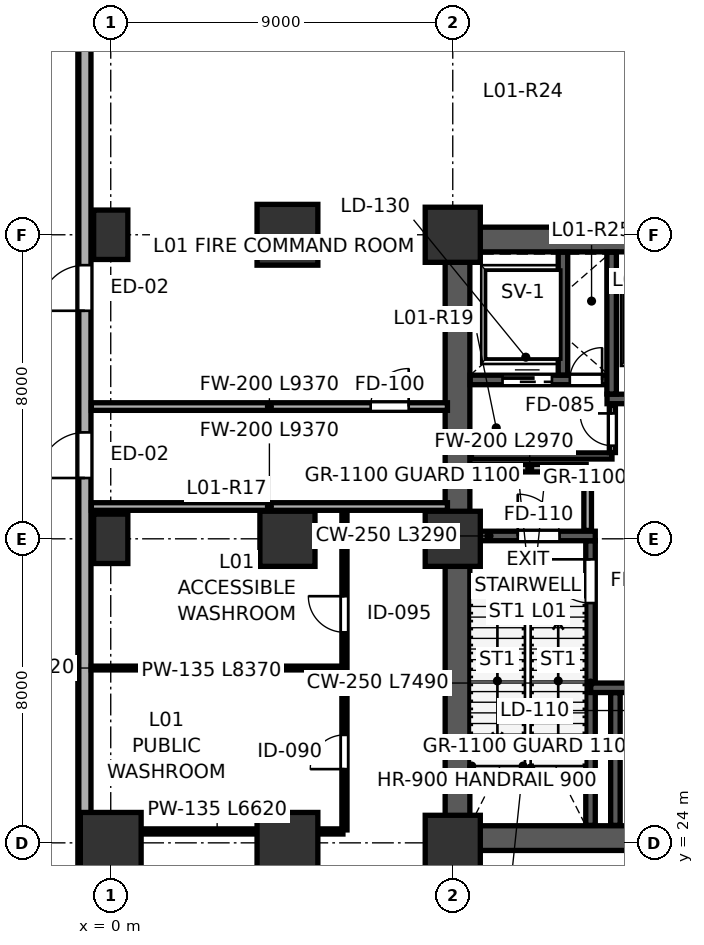
"""IFC4 building model, lengths in metres.
Left out: names, types, materials, properties, quantities, classifications, styles, units other than length and angle.
Written with IfcOpenShell. Run it as: python <this file> out.ifc"""

import sys

from ifc_helpers import new_model, si_unit, direction, frame, frame_2d, origin, origin_2d, place, context, subcontext, project, spatial, rectangle, extrude, source, transform, mapped, element, fill, save


model = new_model("IFC4")
c1 = context("Model", 3, precision=1e-05, world=origin(), true_north=direction((0.0, 1.0)))
c2 = subcontext(c1, "Body", "Model", "MODEL_VIEW")
j1 = project(units=[si_unit("LENGTHUNIT", "METRE"), si_unit("PLANEANGLEUNIT", "RADIAN")], contexts=[c1])
p1 = place(None, origin())
s1 = spatial("IfcSite", under=j1, at=p1, CompositionType="ELEMENT")
p2 = place(p1, origin())
s2 = spatial("IfcBuilding", under=s1, at=p2, CompositionType="ELEMENT")
p3 = place(p2, origin())
s3 = spatial("IfcBuildingStorey", under=s2, at=p3, CompositionType="ELEMENT", Elevation=0.0)
m1 = source(origin(), c2, "Body", "SweptSolid", [
    extrude(rectangle(XDim=1.6, YDim=1.6, at=origin_2d()), origin(), (0.0, 0.0, 1.0), 5.999),
])
p4 = place(p3, frame((0.0, 24.0, 0.001), z_axis=(0.0, 0.0, 1.0), x_axis=(1.0, 0.0, 0.0)))
e1 = element("IfcColumn", 1, at=p4, inside=s3, PredefinedType="COLUMN", context=c2, shape_type="MappedRepresentation", body=[
    mapped(m1, transform((0.0, 0.0, 0.0), scale=1.0)),
])
m2 = source(origin(), c2, "Body", "SweptSolid", [
    extrude(rectangle(XDim=0.9, YDim=1.3, at=origin_2d()), origin(), (0.0, 0.0, 1.0), 5.999),
])
for number, where, z_axis, x_axis in (
    (2, (0.0, 32.0, 0.001), (0.0, 0.0, 1.0), (1.0, 0.0, 0.0)),
    (3, (0.0, 40.0, 0.001), (0.0, 0.0, 1.0), (1.0, 0.0, 0.0)),
):
    element("IfcColumn", number, at=place(p3, frame(where, z_axis=z_axis, x_axis=x_axis)), inside=s3, PredefinedType="PILASTER", context=c2, shape_type="MappedRepresentation", body=[
        mapped(m2, transform((0.0, 0.0, 0.0), scale=1.0)),
    ])
m3 = source(origin(), c2, "Body", "SweptSolid", [
    extrude(rectangle(XDim=1.45, YDim=1.45, at=origin_2d()), origin(), (0.0, 0.0, 1.0), 5.999),
])
p5 = place(p3, frame((9.0, 24.0, 0.001), z_axis=(0.0, 0.0, 1.0), x_axis=(1.0, 0.0, 0.0)))
e4 = element("IfcColumn", 4, at=p5, inside=s3, PredefinedType="COLUMN", context=c2, shape_type="MappedRepresentation", body=[
    mapped(m3, transform((0.0, 0.0, 0.0), scale=1.0)),
])
m4 = source(origin(), c2, "Body", "SweptSolid", [
    extrude(rectangle(XDim=1.45, YDim=1.45, at=origin_2d()), origin(), (0.0, 0.0, 1.0), 5.999),
])
for number, where, z_axis, x_axis in (
    (5, (9.0, 32.0, 0.001), (0.0, 0.0, 1.0), (1.0, 0.0, 0.0)),
    (6, (9.0, 40.0, 0.001), (0.0, 0.0, 1.0), (1.0, 0.0, 0.0)),
):
    element("IfcColumn", number, at=place(p3, frame(where, z_axis=z_axis, x_axis=x_axis)), inside=s3, PredefinedType="COLUMN", context=c2, shape_type="MappedRepresentation", body=[
        mapped(m4, transform((0.0, 0.0, 0.0), scale=1.0)),
    ])
p6 = place(p3, frame((4.65, 24.0, 0.001), z_axis=(0.0, 0.0, 1.0), x_axis=(1.0, 0.0, 0.0)))
e7 = element("IfcColumn", 7, at=p6, inside=s3, PredefinedType="COLUMN", context=c2, shape_type="MappedRepresentation", body=[
    mapped(m1, transform((0.0, 0.0, 0.0), scale=1.0)),
])
p7 = place(p3, frame((4.65, 32.0, 0.001), z_axis=(0.0, 0.0, 1.0), x_axis=(1.0, 0.0, 0.0)))
e8 = element("IfcColumn", 8, at=p7, inside=s3, PredefinedType="COLUMN", context=c2, shape_type="MappedRepresentation", body=[
    mapped(m4, transform((0.0, 0.0, 0.0), scale=1.0)),
])
m5 = source(origin(), c2, "Body", "SweptSolid", [
    extrude(rectangle(XDim=1.6, YDim=1.6, at=origin_2d()), origin(), (0.0, 0.0, 1.0), 5.999),
])
p8 = place(p3, frame((4.65, 40.0, 0.001), z_axis=(0.0, 0.0, 1.0), x_axis=(1.0, 0.0, 0.0)))
e9 = element("IfcColumn", 9, at=p8, inside=s3, PredefinedType="COLUMN", context=c2, shape_type="MappedRepresentation", body=[
    mapped(m5, transform((0.0, 0.0, 0.0), scale=1.0)),
])
p9 = place(p3, frame((-0.68, 3.6, 0.0), z_axis=(0.0, 0.0, 1.0), x_axis=(0.0, 1.0, 0.0)))
e10 = element("IfcWall", 10, at=p9, inside=s3, PredefinedType="SOLIDWALL", context=c2, shape_type="SweptSolid", body=[
    extrude(rectangle(XDim=49.8, YDim=0.32, at=frame_2d((24.9, 0.0))), origin(), (0.0, 0.0, 1.0), 5.74),
])
p10 = place(p9, frame((34.4, 0.0, 0.0)))
e11 = element("IfcOpeningElement", 11, at=p10, cuts=e10, PredefinedType="OPENING", context=c2, shape_type="SweptSolid", body=[
    extrude(rectangle(XDim=1.2, YDim=2.2, at=frame_2d((0.6, 1.1))), frame((0.0, 0.17, 0.0), z_axis=(0.0, -1.0, 0.0), x_axis=(1.0, 0.0, 0.0)), (0.0, 0.0, 1.0), 0.34),
])
p11 = place(p9, frame((30.0, 0.0, 0.0)))
e12 = element("IfcOpeningElement", 12, at=p11, cuts=e10, PredefinedType="OPENING", context=c2, shape_type="SweptSolid", body=[
    extrude(rectangle(XDim=1.2, YDim=2.2, at=frame_2d((0.6, 1.1))), frame((0.0, 0.17, 0.0), z_axis=(0.0, -1.0, 0.0), x_axis=(1.0, 0.0, 0.0)), (0.0, 0.0, 1.0), 0.34),
])
p12 = place(p9, frame((5.4, 0.0, 0.0)))
e13 = element("IfcOpeningElement", 13, at=p12, cuts=e10, PredefinedType="OPENING", context=c2, shape_type="SweptSolid", body=[
    extrude(rectangle(XDim=1.2, YDim=2.2, at=frame_2d((0.6, 1.1))), frame((0.0, 0.17, 0.0), z_axis=(0.0, -1.0, 0.0), x_axis=(1.0, 0.0, 0.0)), (0.0, 0.0, 1.0), 0.34),
])
p13 = place(p3, frame((9.125, 24.45, 0.0), z_axis=(0.0, 0.0, 1.0), x_axis=(0.0, 1.0, 0.0)))
e14 = element("IfcWall", 14, at=p13, inside=s3, PredefinedType="SHEAR", context=c2, shape_type="SweptSolid", body=[
    extrude(rectangle(XDim=15.1, YDim=0.65, at=frame_2d((7.55, 0.0))), origin(), (0.0, 0.0, 1.0), 5.74),
])
for number, where, z_axis, x_axis in (
    (15, (8.8, 24.125, 0.0), (0.0, 0.0, 1.0), (1.0, 0.0, 0.0)),
    (16, (8.8, 39.875, 0.0), (0.0, 0.0, 1.0), (1.0, 0.0, 0.0)),
):
    element("IfcWall", number, at=place(p3, frame(where, z_axis=z_axis, x_axis=x_axis)), inside=s3, PredefinedType="SHEAR", context=c2, shape_type="SweptSolid", body=[
        extrude(rectangle(XDim=18.4, YDim=0.65, at=frame_2d((9.2, 0.0))), origin(), (0.0, 0.0, 1.0), 5.74),
    ])
p14 = place(p3, frame((12.625, 24.46, 0.0), z_axis=(0.0, 0.0, 1.0), x_axis=(0.0, 1.0, 0.0)))
e17 = element("IfcWall", 17, at=p14, inside=s3, PredefinedType="SHEAR", context=c2, shape_type="SweptSolid", body=[
    extrude(rectangle(XDim=7.49, YDim=0.25, at=frame_2d((3.745, 0.0))), origin(), (0.0, 0.0, 1.0), 5.74),
])
p15 = place(p14, frame((5.85, 0.0, 0.0)))
e18 = element("IfcOpeningElement", 18, at=p15, cuts=e17, PredefinedType="OPENING", context=c2, shape_type="SweptSolid", body=[
    extrude(rectangle(XDim=1.15, YDim=2.2, at=frame_2d((0.575, 1.1))), frame((0.0, 0.135, 0.0), z_axis=(0.0, -1.0, 0.0), x_axis=(1.0, 0.0, 0.0)), (0.0, 0.0, 1.0), 0.27),
])
p16 = place(p3, frame((9.46, 32.075, 0.0), z_axis=(0.0, 0.0, 1.0), x_axis=(1.0, 0.0, 0.0)))
e19 = element("IfcWall", 19, at=p16, inside=s3, PredefinedType="SHEAR", context=c2, shape_type="SweptSolid", body=[
    extrude(rectangle(XDim=3.29, YDim=0.25, at=frame_2d((1.645, 0.0))), origin(), (0.0, 0.0, 1.0), 5.74),
])
p17 = place(p16, frame((1.25, 0.0, 0.0)))
e20 = element("IfcOpeningElement", 20, at=p17, cuts=e19, PredefinedType="OPENING", context=c2, shape_type="SweptSolid", body=[
    extrude(rectangle(XDim=1.1, YDim=2.2, at=frame_2d((0.55, 1.1))), frame((0.0, 0.135, 0.0), z_axis=(0.0, -1.0, 0.0), x_axis=(1.0, 0.0, 0.0)), (0.0, 0.0, 1.0), 0.27),
])
p18 = place(p3, frame((9.46, 36.18, 0.0), z_axis=(0.0, 0.0, 1.0), x_axis=(1.0, 0.0, 0.0)))
e21 = element("IfcWall", 21, at=p18, inside=s3, PredefinedType="SHEAR", context=c2, shape_type="SweptSolid", body=[
    extrude(rectangle(XDim=3.79, YDim=0.25, at=frame_2d((1.895, 0.0))), origin(), (0.0, 0.0, 1.0), 5.74),
])
p19 = place(p18, frame((2.62, 0.0, 0.0)))
e22 = element("IfcOpeningElement", 22, at=p19, cuts=e21, PredefinedType="OPENING", context=c2, shape_type="SweptSolid", body=[
    extrude(rectangle(XDim=0.85, YDim=2.1, at=frame_2d((0.425, 1.05))), frame((0.0, 0.135, 0.0), z_axis=(0.0, -1.0, 0.0), x_axis=(1.0, 0.0, 0.0)), (0.0, 0.0, 1.0), 0.27),
])
p20 = place(p18, frame((0.85, 0.0, 0.0)))
e23 = element("IfcOpeningElement", 23, at=p20, cuts=e21, PredefinedType="OPENING", context=c2, shape_type="SweptSolid", body=[
    extrude(rectangle(XDim=1.3, YDim=2.25, at=frame_2d((0.65, 1.125))), frame((0.0, 0.135, 0.0), z_axis=(0.0, -1.0, 0.0), x_axis=(1.0, 0.0, 0.0)), (0.0, 0.0, 1.0), 0.27),
])
p21 = place(p3, frame((11.9, 36.31, 0.0), z_axis=(0.0, 0.0, 1.0), x_axis=(0.0, 1.0, 0.0)))
e24 = element("IfcWall", 24, at=p21, inside=s3, PredefinedType="SHEAR", context=c2, shape_type="SweptSolid", body=[
    extrude(rectangle(XDim=3.23, YDim=0.25, at=frame_2d((1.615, 0.0))), origin(), (0.0, 0.0, 1.0), 5.74),
])
p22 = place(p3, frame((12.63, 28.08, 0.0), z_axis=(0.0, 0.0, 1.0), x_axis=(1.0, 0.0, 0.0)))
e25 = element("IfcWall", 25, at=p22, inside=s3, PredefinedType="SHEAR", context=c2, shape_type="SweptSolid", body=[
    extrude(rectangle(XDim=6.71, YDim=0.25, at=frame_2d((3.355, 0.0))), origin(), (0.0, 0.0, 1.0), 5.74),
])
p23 = place(p22, frame((1.43, 0.0, 0.0)))
e26 = element("IfcOpeningElement", 26, at=p23, cuts=e25, PredefinedType="OPENING", context=c2, shape_type="SweptSolid", body=[
    extrude(rectangle(XDim=1.1, YDim=2.2, at=frame_2d((0.55, 1.1))), frame((0.0, 0.135, 0.0), z_axis=(0.0, -1.0, 0.0), x_axis=(1.0, 0.0, 0.0)), (0.0, 0.0, 1.0), 0.27),
])
p24 = place(p22, frame((4.43, 0.0, 0.0)))
e27 = element("IfcOpeningElement", 27, at=p24, cuts=e25, PredefinedType="OPENING", context=c2, shape_type="SweptSolid", body=[
    extrude(rectangle(XDim=1.1, YDim=2.2, at=frame_2d((0.55, 1.1))), frame((0.0, 0.135, 0.0), z_axis=(0.0, -1.0, 0.0), x_axis=(1.0, 0.0, 0.0)), (0.0, 0.0, 1.0), 0.27),
])
p25 = place(p3, frame((13.28, 24.46, 0.0), z_axis=(0.0, 0.0, 1.0), x_axis=(0.0, 1.0, 0.0)))
e28 = element("IfcWall", 28, at=p25, inside=s3, PredefinedType="SHEAR", context=c2, shape_type="SweptSolid", body=[
    extrude(rectangle(XDim=3.49, YDim=0.25, at=frame_2d((1.745, 0.0))), origin(), (0.0, 0.0, 1.0), 5.74),
])
p26 = place(p3, frame((13.06, 35.68, 0.0), z_axis=(0.0, 0.0, 1.0), x_axis=(1.0, 0.0, 0.0)))
e29 = element("IfcWall", 29, at=p26, inside=s3, PredefinedType="SHEAR", context=c2, shape_type="SweptSolid", body=[
    extrude(rectangle(XDim=4.25, YDim=0.25, at=frame_2d((2.125, 0.0))), origin(), (0.0, 0.0, 1.0), 5.74),
])
p27 = place(p26, frame((0.65, 0.0, 0.0)))
e30 = element("IfcOpeningElement", 30, at=p27, cuts=e29, PredefinedType="OPENING", context=c2, shape_type="SweptSolid", body=[
    extrude(rectangle(XDim=1.1, YDim=2.2, at=frame_2d((0.55, 1.1))), frame((0.0, 0.135, 0.0), z_axis=(0.0, -1.0, 0.0), x_axis=(1.0, 0.0, 0.0)), (0.0, 0.0, 1.0), 0.27),
])
p28 = place(p26, frame((2.65, 0.0, 0.0)))
e31 = element("IfcOpeningElement", 31, at=p28, cuts=e29, PredefinedType="OPENING", context=c2, shape_type="SweptSolid", body=[
    extrude(rectangle(XDim=1.1, YDim=2.2, at=frame_2d((0.55, 1.1))), frame((0.0, 0.135, 0.0), z_axis=(0.0, -1.0, 0.0), x_axis=(1.0, 0.0, 0.0)), (0.0, 0.0, 1.0), 0.27),
])
p29 = place(p3, frame((13.18, 35.81, 0.0), z_axis=(0.0, 0.0, 1.0), x_axis=(0.0, 1.0, 0.0)))
e32 = element("IfcWall", 32, at=p29, inside=s3, PredefinedType="SHEAR", context=c2, shape_type="SweptSolid", body=[
    extrude(rectangle(XDim=3.73, YDim=0.25, at=frame_2d((1.865, 0.0))), origin(), (0.0, 0.0, 1.0), 5.74),
])
p30 = place(p3, frame((9.49, 34.18, 0.0), z_axis=(0.0, 0.0, 1.0), x_axis=(1.0, 0.0, 0.0)))
e33 = element("IfcWall", 33, at=p30, inside=s3, PredefinedType="PARTITIONING", context=c2, shape_type="SweptSolid", body=[
    extrude(rectangle(XDim=3.7, YDim=0.16, at=frame_2d((1.85, 0.0))), origin(), (0.0, 0.0, 1.0), 5.74),
])
p31 = place(p3, frame((13.2, 34.27, 0.0), z_axis=(0.0, 0.0, 1.0), x_axis=(0.0, 1.0, 0.0)))
e34 = element("IfcWall", 34, at=p31, inside=s3, PredefinedType="PARTITIONING", context=c2, shape_type="SweptSolid", body=[
    extrude(rectangle(XDim=1.24, YDim=0.16, at=frame_2d((0.62, 0.0))), origin(), (0.0, 0.0, 1.0), 5.74),
])
p32 = place(p31, frame((0.18, 0.0, 0.0)))
e35 = element("IfcOpeningElement", 35, at=p32, cuts=e34, PredefinedType="OPENING", context=c2, shape_type="SweptSolid", body=[
    extrude(rectangle(XDim=0.85, YDim=2.1, at=frame_2d((0.425, 1.05))), frame((0.0, 0.09, 0.0), z_axis=(0.0, -1.0, 0.0), x_axis=(1.0, 0.0, 0.0)), (0.0, 0.0, 1.0), 0.18),
])
p33 = place(p3, frame((-0.51, 24.3, 0.0), z_axis=(0.0, 0.0, 1.0), x_axis=(1.0, 0.0, 0.0)))
e36 = element("IfcWall", 36, at=p33, inside=s3, PredefinedType="PARTITIONING", context=c2, shape_type="SweptSolid", body=[
    extrude(rectangle(XDim=6.62, YDim=0.135, at=frame_2d((3.31, 0.0))), origin(), (0.0, 0.0, 1.0), 4.869),
])
p34 = place(p3, frame((-0.51, 28.6, 0.0), z_axis=(0.0, 0.0, 1.0), x_axis=(1.0, 0.0, 0.0)))
e37 = element("IfcWall", 37, at=p34, inside=s3, PredefinedType="PARTITIONING", context=c2, shape_type="SweptSolid", body=[
    extrude(rectangle(XDim=6.62, YDim=0.1, at=frame_2d((3.31, 0.0))), origin(), (0.0, 0.0, 1.0), 4.875),
])
p35 = place(p3, frame((6.15, 24.34, 0.0), z_axis=(0.0, 0.0, 1.0), x_axis=(0.0, 1.0, 0.0)))
e38 = element("IfcWall", 38, at=p35, inside=s3, PredefinedType="PARTITIONING", context=c2, shape_type="SweptSolid", body=[
    extrude(rectangle(XDim=8.37, YDim=0.135, at=frame_2d((4.185, 0.0))), origin(), (0.0, 0.0, 1.0), 4.875),
])
p36 = place(p35, frame((1.6, 0.0, 0.0)))
e39 = element("IfcOpeningElement", 39, at=p36, cuts=e38, PredefinedType="OPENING", context=c2, shape_type="SweptSolid", body=[
    extrude(rectangle(XDim=0.9, YDim=2.15, at=frame_2d((0.45, 1.075))), frame((0.0, 0.078, 0.0), z_axis=(0.0, -1.0, 0.0), x_axis=(1.0, 0.0, 0.0)), (0.0, 0.0, 1.0), 0.155),
])
p37 = place(p35, frame((5.2, 0.0, 0.0)))
e40 = element("IfcOpeningElement", 40, at=p37, cuts=e38, PredefinedType="OPENING", context=c2, shape_type="SweptSolid", body=[
    extrude(rectangle(XDim=0.95, YDim=2.15, at=frame_2d((0.475, 1.075))), frame((0.0, 0.078, 0.0), z_axis=(0.0, -1.0, 0.0), x_axis=(1.0, 0.0, 0.0)), (0.0, 0.0, 1.0), 0.155),
])
p38 = place(p3, frame((-0.51, 32.85, 0.0), z_axis=(0.0, 0.0, 1.0), x_axis=(1.0, 0.0, 0.0)))
e41 = element("IfcWall", 41, at=p38, inside=s3, PredefinedType="SOLIDWALL", context=c2, shape_type="SweptSolid", body=[
    extrude(rectangle(XDim=9.37, YDim=0.2, at=frame_2d((4.685, 0.0))), origin(), (0.0, 0.0, 1.0), 4.875),
])
p39 = place(p3, frame((-0.51, 35.48, 0.0), z_axis=(0.0, 0.0, 1.0), x_axis=(1.0, 0.0, 0.0)))
e42 = element("IfcWall", 42, at=p39, inside=s3, PredefinedType="SOLIDWALL", context=c2, shape_type="SweptSolid", body=[
    extrude(rectangle(XDim=9.37, YDim=0.2, at=frame_2d((4.685, 0.0))), origin(), (0.0, 0.0, 1.0), 4.875),
])
p40 = place(p39, frame((7.35, 0.0, 0.0)))
e43 = element("IfcOpeningElement", 43, at=p40, cuts=e42, PredefinedType="OPENING", context=c2, shape_type="SweptSolid", body=[
    extrude(rectangle(XDim=1.0, YDim=2.15, at=frame_2d((0.5, 1.075))), frame((0.0, 0.11, 0.0), z_axis=(0.0, -1.0, 0.0), x_axis=(1.0, 0.0, 0.0)), (0.0, 0.0, 1.0), 0.22),
])
p41 = place(p3, frame((9.54, 33.86, 0.0), z_axis=(0.0, 0.0, 1.0), x_axis=(1.0, 0.0, 0.0)))
e44 = element("IfcWall", 44, at=p41, inside=s3, PredefinedType="SOLIDWALL", context=c2, shape_type="SweptSolid", body=[
    extrude(rectangle(XDim=2.97, YDim=0.2, at=frame_2d((1.485, 0.0))), origin(), (0.0, 0.0, 1.0), 5.74),
])
p42 = place(p3, frame((12.55, 32.22, 0.0), z_axis=(0.0, 0.0, 1.0), x_axis=(0.0, 1.0, 0.0)))
e45 = element("IfcWall", 45, at=p42, inside=s3, PredefinedType="SOLIDWALL", context=c2, shape_type="SweptSolid", body=[
    extrude(rectangle(XDim=1.6, YDim=0.2, at=frame_2d((0.8, 0.0))), origin(), (0.0, 0.0, 1.0), 5.74),
])
m6 = source(origin(), c2, "Body", "SweptSolid", [
    extrude(rectangle(XDim=1.2, YDim=2.2, at=frame_2d((0.6, 1.1))), frame((0.0, 0.025, 0.0), z_axis=(0.0, -1.0, 0.0), x_axis=(1.0, 0.0, 0.0)), (0.0, 0.0, 1.0), 0.05),
])
p43 = place(p10, origin())
e46 = element("IfcDoor", 46, at=p43, inside=s3, OperationType="SINGLE_SWING_LEFT", PredefinedType="DOOR", context=c2, shape_type="MappedRepresentation", body=[
    mapped(m6, transform((0.0, 0.0, 0.0), scale=1.0)),
])
fill(e11, e46)
p44 = place(p11, origin())
e47 = element("IfcDoor", 47, at=p44, inside=s3, OperationType="SINGLE_SWING_LEFT", PredefinedType="DOOR", context=c2, shape_type="MappedRepresentation", body=[
    mapped(m6, transform((0.0, 0.0, 0.0), scale=1.0)),
])
fill(e12, e47)
m7 = source(origin(), c2, "Body", "SweptSolid", [
    extrude(rectangle(XDim=1.15, YDim=2.2, at=frame_2d((0.575, 1.1))), frame((0.0, 0.025, 0.0), z_axis=(0.0, -1.0, 0.0), x_axis=(1.0, 0.0, 0.0)), (0.0, 0.0, 1.0), 0.05),
])
p45 = place(p15, origin())
e48 = element("IfcDoor", 48, at=p45, inside=s3, OperationType="SINGLE_SWING_RIGHT", PredefinedType="DOOR", context=c2, shape_type="MappedRepresentation", body=[
    mapped(m7, transform((0.0, 0.0, 0.0), scale=1.0)),
])
fill(e18, e48)
m8 = source(origin(), c2, "Body", "SweptSolid", [
    extrude(rectangle(XDim=0.85, YDim=2.1, at=frame_2d((0.425, 1.05))), frame((0.0, 0.025, 0.0), z_axis=(0.0, -1.0, 0.0), x_axis=(1.0, 0.0, 0.0)), (0.0, 0.0, 1.0), 0.05),
])
p46 = place(p19, origin())
e49 = element("IfcDoor", 49, at=p46, inside=s3, OperationType="SINGLE_SWING_RIGHT", PredefinedType="DOOR", context=c2, shape_type="MappedRepresentation", body=[
    mapped(m8, transform((0.0, 0.0, 0.0), scale=1.0)),
])
fill(e22, e49)
m9 = source(origin(), c2, "Body", "SweptSolid", [
    extrude(rectangle(XDim=1.1, YDim=2.2, at=frame_2d((0.55, 1.1))), frame((0.0, 0.025, 0.0), z_axis=(0.0, -1.0, 0.0), x_axis=(1.0, 0.0, 0.0)), (0.0, 0.0, 1.0), 0.05),
])
p47 = place(p17, origin())
e50 = element("IfcDoor", 50, at=p47, inside=s3, OperationType="SINGLE_SWING_LEFT", PredefinedType="DOOR", context=c2, shape_type="MappedRepresentation", body=[
    mapped(m9, transform((0.0, 0.0, 0.0), scale=1.0)),
])
fill(e20, e50)
m10 = source(origin(), c2, "Body", "SweptSolid", [
    extrude(rectangle(XDim=1.3, YDim=2.25, at=frame_2d((0.65, 1.125))), frame((0.0, 0.025, 0.0), z_axis=(0.0, -1.0, 0.0), x_axis=(1.0, 0.0, 0.0)), (0.0, 0.0, 1.0), 0.05),
])
p48 = place(p20, origin())
e51 = element("IfcDoor", 51, at=p48, inside=s3, OperationType="SLIDING_TO_LEFT", PredefinedType="DOOR", context=c2, shape_type="MappedRepresentation", body=[
    mapped(m10, transform((0.0, 0.0, 0.0), scale=1.0)),
])
fill(e23, e51)
p49 = place(p32, origin())
e52 = element("IfcDoor", 52, at=p49, inside=s3, OperationType="SINGLE_SWING_RIGHT", PredefinedType="DOOR", context=c2, shape_type="MappedRepresentation", body=[
    mapped(m8, transform((0.0, 0.0, 0.0), scale=1.0)),
])
fill(e35, e52)
m11 = source(origin(), c2, "Body", "SweptSolid", [
    extrude(rectangle(XDim=0.9, YDim=2.15, at=frame_2d((0.45, 1.075))), frame((0.0, 0.025, 0.0), z_axis=(0.0, -1.0, 0.0), x_axis=(1.0, 0.0, 0.0)), (0.0, 0.0, 1.0), 0.05),
])
p50 = place(p36, origin())
e53 = element("IfcDoor", 53, at=p50, inside=s3, OperationType="SINGLE_SWING_LEFT", PredefinedType="DOOR", context=c2, shape_type="MappedRepresentation", body=[
    mapped(m11, transform((0.0, 0.0, 0.0), scale=1.0)),
])
fill(e39, e53)
m12 = source(origin(), c2, "Body", "SweptSolid", [
    extrude(rectangle(XDim=0.95, YDim=2.15, at=frame_2d((0.475, 1.075))), frame((0.0, 0.025, 0.0), z_axis=(0.0, -1.0, 0.0), x_axis=(1.0, 0.0, 0.0)), (0.0, 0.0, 1.0), 0.05),
])
p51 = place(p37, origin())
e54 = element("IfcDoor", 54, at=p51, inside=s3, OperationType="SINGLE_SWING_RIGHT", PredefinedType="DOOR", context=c2, shape_type="MappedRepresentation", body=[
    mapped(m12, transform((0.0, 0.0, 0.0), scale=1.0)),
])
fill(e40, e54)
m13 = source(origin(), c2, "Body", "SweptSolid", [
    extrude(rectangle(XDim=1.0, YDim=2.15, at=frame_2d((0.5, 1.075))), frame((0.0, 0.025, 0.0), z_axis=(0.0, -1.0, 0.0), x_axis=(1.0, 0.0, 0.0)), (0.0, 0.0, 1.0), 0.05),
])
p52 = place(p40, origin())
e55 = element("IfcDoor", 55, at=p52, inside=s3, OperationType="SINGLE_SWING_RIGHT", PredefinedType="DOOR", context=c2, shape_type="MappedRepresentation", body=[
    mapped(m13, transform((0.0, 0.0, 0.0), scale=1.0)),
])
fill(e43, e55)
save(model, sys.argv[1])
